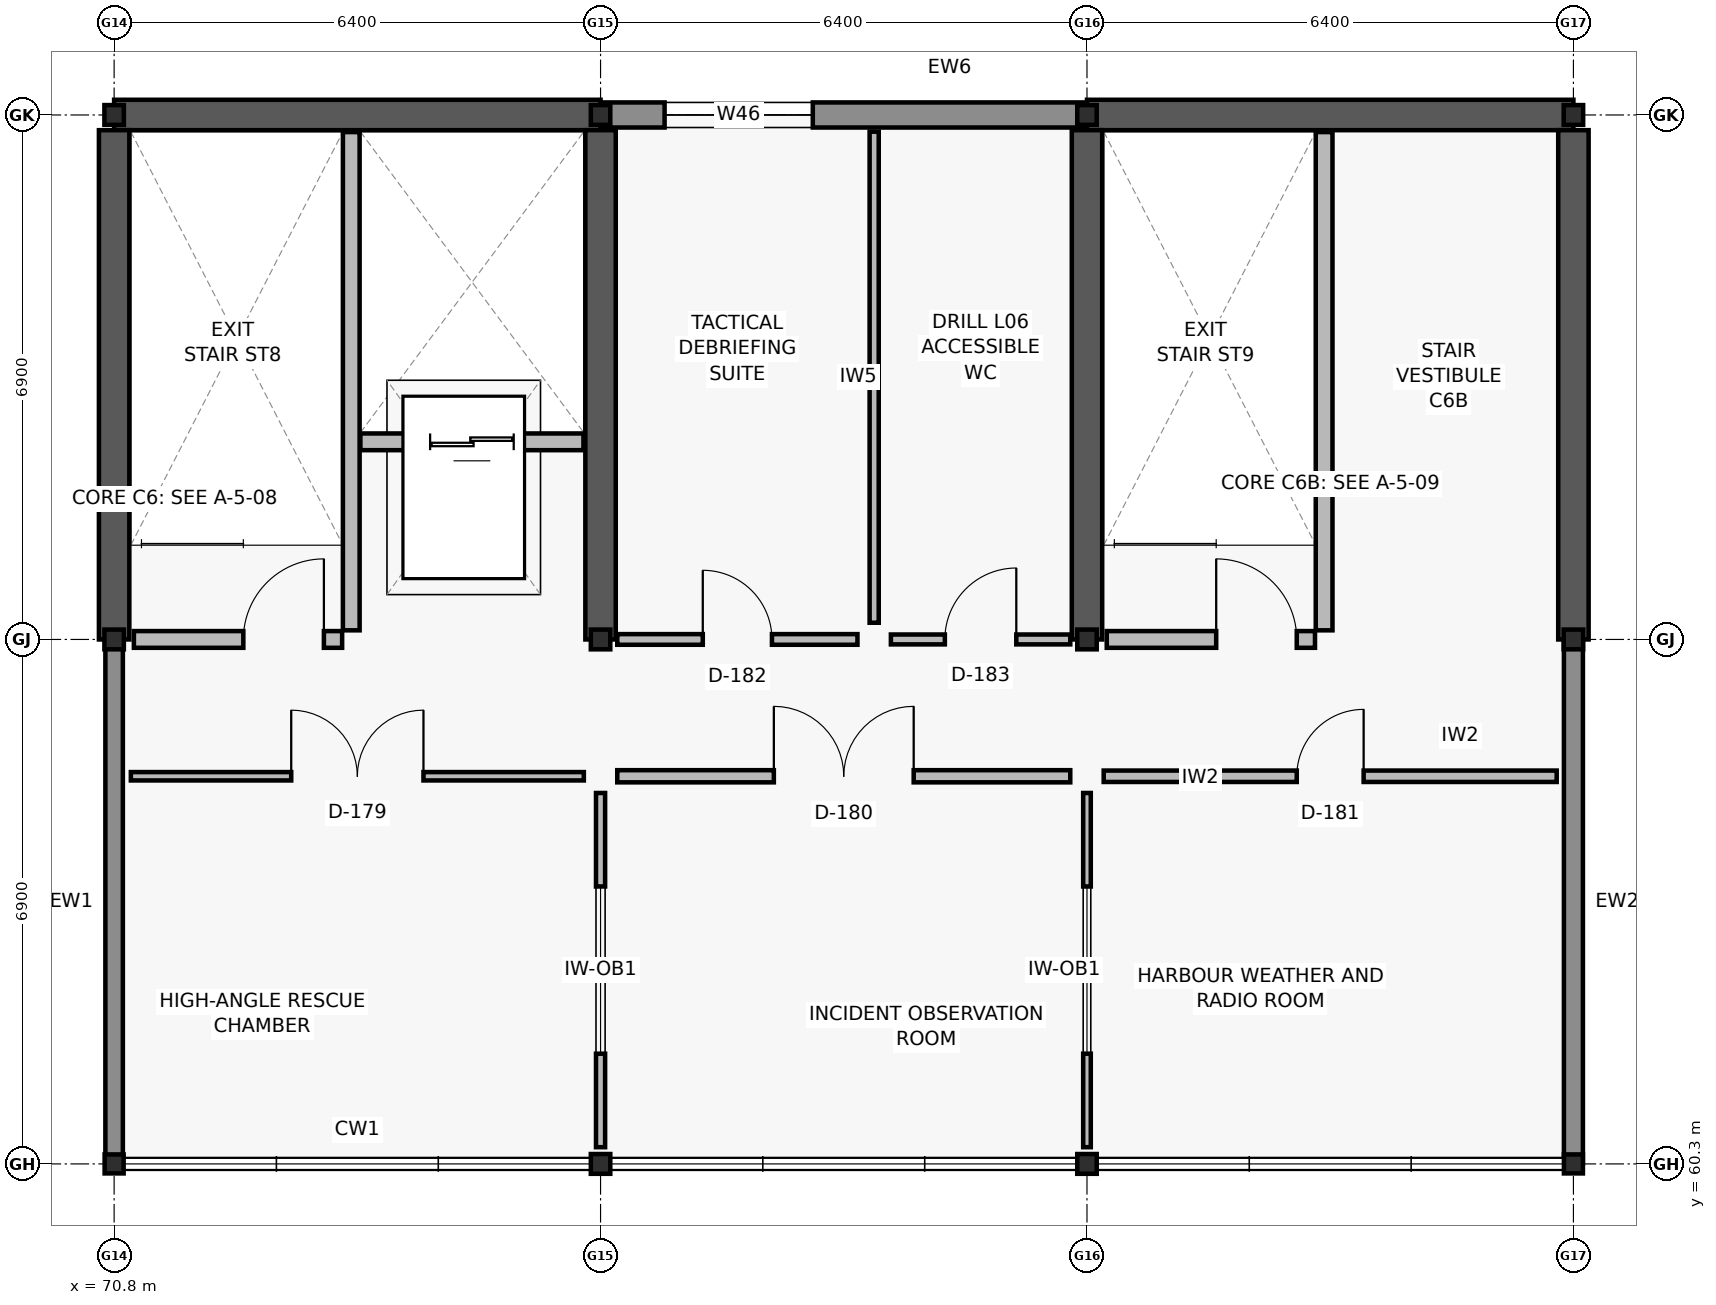
"""IFC4 building model, lengths in metres.
Left out: names, types, materials, properties, quantities, classifications, styles, units other than length and angle.
Written with IfcOpenShell. Run it as: python <this file> out.ifc"""

import sys

from ifc_helpers import new_model, si_unit, direction, frame, frame_2d, origin, origin_2d, place, context, subcontext, project, spatial, rectangle, hollow_rectangle, i_section, extrude, element, fill, save


model = new_model("IFC4")
c1 = context("Model", 3, precision=1e-05, world=origin(), true_north=direction((0.0, 1.0)))
c2 = subcontext(c1, "Body", "Model", "MODEL_VIEW")
j1 = project(units=[si_unit("LENGTHUNIT", "METRE"), si_unit("PLANEANGLEUNIT", "RADIAN")], contexts=[c1])
p1 = place(None, origin())
s1 = spatial("IfcSite", under=j1, at=p1, CompositionType="ELEMENT")
p2 = place(p1, origin())
s2 = spatial("IfcBuilding", under=s1, at=p2, CompositionType="ELEMENT")
p3 = place(p2, frame((0.0, 0.0, 25.2)))
s3 = spatial("IfcBuildingStorey", under=s2, at=p3, CompositionType="ELEMENT", Elevation=25.2)
p4 = place(p3, frame((70.8, 60.3, 0.0), z_axis=(0.0, 0.0, 1.0), x_axis=(1.0, 0.0, 0.0)))
e1 = element("IfcColumn", 1, at=p4, inside=s3, PredefinedType="COLUMN", context=c2, shape_type="SweptSolid", body=[
    extrude(hollow_rectangle(XDim=0.25, YDim=0.25, WallThickness=0.012, at=origin_2d()), origin(), (0.0, 0.0, 1.0), 3.9),
])
for number, where, z_axis, x_axis in (
    (2, (70.8, 67.2, 0.0), (0.0, 0.0, 1.0), (1.0, 0.0, 0.0)),
    (3, (70.8, 74.1, 0.0), (0.0, 0.0, 1.0), (1.0, 0.0, 0.0)),
    (4, (77.2, 60.3, 0.0), (0.0, 0.0, 1.0), (1.0, 0.0, 0.0)),
    (5, (77.2, 67.2, 0.0), (0.0, 0.0, 1.0), (1.0, 0.0, 0.0)),
    (6, (77.2, 74.1, 0.0), (0.0, 0.0, 1.0), (1.0, 0.0, 0.0)),
    (7, (83.6, 60.3, 0.0), (0.0, 0.0, 1.0), (1.0, 0.0, 0.0)),
    (8, (83.6, 67.2, 0.0), (0.0, 0.0, 1.0), (1.0, 0.0, 0.0)),
    (9, (83.6, 74.1, 0.0), (0.0, 0.0, 1.0), (1.0, 0.0, 0.0)),
):
    element("IfcColumn", number, at=place(p3, frame(where, z_axis=z_axis, x_axis=x_axis)), inside=s3, PredefinedType="COLUMN", context=c2, shape_type="SweptSolid", body=[
        extrude(i_section(OverallWidth=0.256, OverallDepth=0.26, WebThickness=0.01, FlangeThickness=0.017, FilletRadius=0.013, at=origin_2d()), origin(), (0.0, 0.0, 1.0), 3.9),
    ])
p5 = place(p3, frame((90.0, 60.3, 0.0), z_axis=(0.0, 0.0, 1.0), x_axis=(1.0, 0.0, 0.0)))
e10 = element("IfcColumn", 10, at=p5, inside=s3, PredefinedType="COLUMN", context=c2, shape_type="SweptSolid", body=[
    extrude(hollow_rectangle(XDim=0.25, YDim=0.25, WallThickness=0.012, at=origin_2d()), origin(), (0.0, 0.0, 1.0), 3.9),
])
for number, where, z_axis, x_axis in (
    (11, (90.0, 67.2, 0.0), (0.0, 0.0, 1.0), (1.0, 0.0, 0.0)),
    (12, (90.0, 74.1, 0.0), (0.0, 0.0, 1.0), (1.0, 0.0, 0.0)),
):
    element("IfcColumn", number, at=place(p3, frame(where, z_axis=z_axis, x_axis=x_axis)), inside=s3, PredefinedType="COLUMN", context=c2, shape_type="SweptSolid", body=[
        extrude(i_section(OverallWidth=0.256, OverallDepth=0.26, WebThickness=0.01, FlangeThickness=0.017, FilletRadius=0.013, at=origin_2d()), origin(), (0.0, 0.0, 1.0), 3.9),
    ])
p6 = place(p3, frame((70.8, 74.1, 0.0), z_axis=(0.0, 0.0, 1.0), x_axis=(1.0, 0.0, 0.0)))
e13 = element("IfcWall", 13, at=p6, inside=s3, PredefinedType="SHEAR", context=c2, shape_type="SweptSolid", body=[
    extrude(rectangle(XDim=6.4, YDim=0.4, at=frame_2d((3.2, 0.0))), origin(), (0.0, 0.0, 1.0), 3.66),
])
for number, where, z_axis, x_axis in (
    (14, (70.8, 67.2, 0.0), (0.0, 0.0, 1.0), (0.0, 1.0, 0.0)),
    (15, (77.2, 67.2, 0.0), (0.0, 0.0, 1.0), (0.0, 1.0, 0.0)),
):
    element("IfcWall", number, at=place(p3, frame(where, z_axis=z_axis, x_axis=x_axis)), inside=s3, PredefinedType="SHEAR", context=c2, shape_type="SweptSolid", body=[
        extrude(rectangle(XDim=6.7, YDim=0.4, at=frame_2d((3.35, 0.0))), origin(), (0.0, 0.0, 1.0), 3.66),
    ])
p7 = place(p3, frame((83.6, 74.1, 0.0), z_axis=(0.0, 0.0, 1.0), x_axis=(1.0, 0.0, 0.0)))
e16 = element("IfcWall", 16, at=p7, inside=s3, PredefinedType="SHEAR", context=c2, shape_type="SweptSolid", body=[
    extrude(rectangle(XDim=6.4, YDim=0.4, at=frame_2d((3.2, 0.0))), origin(), (0.0, 0.0, 1.0), 3.66),
])
for number, where, z_axis, x_axis in (
    (17, (83.6, 67.2, 0.0), (0.0, 0.0, 1.0), (0.0, 1.0, 0.0)),
    (18, (90.0, 67.2, 0.0), (0.0, 0.0, 1.0), (0.0, 1.0, 0.0)),
):
    element("IfcWall", number, at=place(p3, frame(where, z_axis=z_axis, x_axis=x_axis)), inside=s3, PredefinedType="SHEAR", context=c2, shape_type="SweptSolid", body=[
        extrude(rectangle(XDim=6.7, YDim=0.4, at=frame_2d((3.35, 0.0))), origin(), (0.0, 0.0, 1.0), 3.66),
    ])
p8 = place(p3, frame((77.205, 74.1, 0.0), z_axis=(0.0, 0.0, 1.0), x_axis=(1.0, 0.0, 0.0)))
e19 = element("IfcWall", 19, at=p8, inside=s3, PredefinedType="SOLIDWALL", context=c2, shape_type="SweptSolid", body=[
    extrude(rectangle(XDim=6.39, YDim=0.33, at=frame_2d((3.195, 0.0))), origin(), (0.0, 0.0, 1.0), 3.02),
])
p9 = place(p8, frame((0.837, 0.0, 0.8)))
e20 = element("IfcOpeningElement", 20, at=p9, cuts=e19, PredefinedType="OPENING", context=c2, shape_type="SweptSolid", body=[
    extrude(rectangle(XDim=1.95, YDim=1.95, at=frame_2d((0.975, 0.975))), frame((0.0, 0.175, 0.0), z_axis=(0.0, -1.0, 0.0), x_axis=(1.0, 0.0, 0.0)), (0.0, 0.0, 1.0), 0.35),
])
p10 = place(p3, frame((70.8, 60.305, 0.0), z_axis=(0.0, 0.0, 1.0), x_axis=(0.0, 1.0, 0.0)))
e21 = element("IfcWall", 21, at=p10, inside=s3, PredefinedType="SOLIDWALL", context=c2, shape_type="SweptSolid", body=[
    extrude(rectangle(XDim=6.89, YDim=0.23, at=frame_2d((3.445, 0.0))), origin(), (0.0, 0.0, 1.0), 3.02),
])
p11 = place(p3, frame((90.0, 67.195, 0.0), z_axis=(0.0, 0.0, 1.0), x_axis=(0.0, -1.0, 0.0)))
e22 = element("IfcWall", 22, at=p11, inside=s3, PredefinedType="SOLIDWALL", context=c2, shape_type="SweptSolid", body=[
    extrude(rectangle(XDim=6.89, YDim=0.25, at=frame_2d((3.445, 0.0))), origin(), (0.0, 0.0, 1.0), 3.02),
])
p12 = place(p3, frame((73.92, 67.32, 0.0), z_axis=(0.0, 0.0, 1.0), x_axis=(0.0, 1.0, 0.0)))
e23 = element("IfcWall", 23, at=p12, inside=s3, PredefinedType="SOLIDWALL", context=c2, shape_type="SweptSolid", body=[
    extrude(rectangle(XDim=6.555, YDim=0.22, at=frame_2d((3.277, 0.0))), origin(), (0.0, 0.0, 1.0), 3.02),
])
p13 = place(p3, frame((71.06, 67.2, 0.0), z_axis=(0.0, 0.0, 1.0), x_axis=(1.0, 0.0, 0.0)))
e24 = element("IfcWall", 24, at=p13, inside=s3, PredefinedType="SOLIDWALL", context=c2, shape_type="SweptSolid", body=[
    extrude(rectangle(XDim=2.74, YDim=0.22, at=frame_2d((1.37, 0.0))), origin(), (0.0, 0.0, 1.0), 3.02),
])
p14 = place(p13, frame((1.44, 0.0, 0.0)))
e25 = element("IfcOpeningElement", 25, at=p14, cuts=e24, PredefinedType="OPENING", context=c2, shape_type="SweptSolid", body=[
    extrude(rectangle(XDim=1.06, YDim=2.1, at=frame_2d((0.53, 1.05))), frame((0.0, 0.12, 0.0), z_axis=(0.0, -1.0, 0.0), x_axis=(1.0, 0.0, 0.0)), (0.0, 0.0, 1.0), 0.24),
])
p15 = place(p3, frame((74.04, 69.8, 0.0), z_axis=(0.0, 0.0, 1.0), x_axis=(1.0, 0.0, 0.0)))
e26 = element("IfcWall", 26, at=p15, inside=s3, PredefinedType="SOLIDWALL", context=c2, shape_type="SweptSolid", body=[
    extrude(rectangle(XDim=2.935, YDim=0.22, at=frame_2d((1.468, 0.0))), origin(), (0.0, 0.0, 1.0), 3.02),
])
p16 = place(p15, frame((0.917, 0.0, 0.0)))
e27 = element("IfcOpeningElement", 27, at=p16, cuts=e26, PredefinedType="OPENING", context=c2, shape_type="SweptSolid", body=[
    extrude(rectangle(XDim=1.1, YDim=2.1, at=frame_2d((0.55, 1.05))), frame((0.0, 0.12, 0.0), z_axis=(0.0, -1.0, 0.0), x_axis=(1.0, 0.0, 0.0)), (0.0, 0.0, 1.0), 0.24),
])
p17 = place(p3, frame((86.72, 67.32, 0.0), z_axis=(0.0, 0.0, 1.0), x_axis=(0.0, 1.0, 0.0)))
e28 = element("IfcWall", 28, at=p17, inside=s3, PredefinedType="SOLIDWALL", context=c2, shape_type="SweptSolid", body=[
    extrude(rectangle(XDim=6.555, YDim=0.22, at=frame_2d((3.277, 0.0))), origin(), (0.0, 0.0, 1.0), 3.66),
])
p18 = place(p3, frame((83.86, 67.2, 0.0), z_axis=(0.0, 0.0, 1.0), x_axis=(1.0, 0.0, 0.0)))
e29 = element("IfcWall", 29, at=p18, inside=s3, PredefinedType="SOLIDWALL", context=c2, shape_type="SweptSolid", body=[
    extrude(rectangle(XDim=2.74, YDim=0.22, at=frame_2d((1.37, 0.0))), origin(), (0.0, 0.0, 1.0), 3.02),
])
p19 = place(p18, frame((1.44, 0.0, 0.0)))
e30 = element("IfcOpeningElement", 30, at=p19, cuts=e29, PredefinedType="OPENING", context=c2, shape_type="SweptSolid", body=[
    extrude(rectangle(XDim=1.06, YDim=2.1, at=frame_2d((0.53, 1.05))), frame((0.0, 0.12, 0.0), z_axis=(0.0, -1.0, 0.0), x_axis=(1.0, 0.0, 0.0)), (0.0, 0.0, 1.0), 0.24),
])
p20 = place(p3, frame((77.2, 60.52, 0.0), z_axis=(0.0, 0.0, 1.0), x_axis=(0.0, 1.0, 0.0)))
e31 = element("IfcWall", 31, at=p20, inside=s3, PredefinedType="PARTITIONING", context=c2, shape_type="SweptSolid", body=[
    extrude(rectangle(XDim=4.66, YDim=0.12, at=frame_2d((2.33, 0.0))), origin(), (0.0, 0.0, 1.0), 3.0),
])
p21 = place(p20, frame((1.23, 0.0, 0.95)))
e32 = element("IfcOpeningElement", 32, at=p21, cuts=e31, PredefinedType="OPENING", context=c2, shape_type="SweptSolid", body=[
    extrude(rectangle(XDim=2.2, YDim=1.3, at=frame_2d((1.1, 0.65))), frame((0.0, 0.07, 0.0), z_axis=(0.0, -1.0, 0.0), x_axis=(1.0, 0.0, 0.0)), (0.0, 0.0, 1.0), 0.14),
])
p22 = place(p3, frame((71.02, 65.4, 0.0), z_axis=(0.0, 0.0, 1.0), x_axis=(1.0, 0.0, 0.0)))
e33 = element("IfcWall", 33, at=p22, inside=s3, PredefinedType="PARTITIONING", context=c2, shape_type="SweptSolid", body=[
    extrude(rectangle(XDim=5.96, YDim=0.11, at=frame_2d((2.98, 0.0))), origin(), (0.0, 0.0, 1.0), 3.0),
])
p23 = place(p22, frame((2.11, 0.0, 0.0)))
e34 = element("IfcOpeningElement", 34, at=p23, cuts=e33, PredefinedType="OPENING", context=c2, shape_type="SweptSolid", body=[
    extrude(rectangle(XDim=1.74, YDim=2.2, at=frame_2d((0.87, 1.1))), frame((0.0, 0.065, 0.0), z_axis=(0.0, -1.0, 0.0), x_axis=(1.0, 0.0, 0.0)), (0.0, 0.0, 1.0), 0.13),
])
p24 = place(p3, frame((83.6, 60.52, 0.0), z_axis=(0.0, 0.0, 1.0), x_axis=(0.0, 1.0, 0.0)))
e35 = element("IfcWall", 35, at=p24, inside=s3, PredefinedType="PARTITIONING", context=c2, shape_type="SweptSolid", body=[
    extrude(rectangle(XDim=4.66, YDim=0.1, at=frame_2d((2.33, 0.0))), origin(), (0.0, 0.0, 1.0), 3.0),
])
p25 = place(p24, frame((1.23, 0.0, 0.95)))
e36 = element("IfcOpeningElement", 36, at=p25, cuts=e35, PredefinedType="OPENING", context=c2, shape_type="SweptSolid", body=[
    extrude(rectangle(XDim=2.2, YDim=1.3, at=frame_2d((1.1, 0.65))), frame((0.0, 0.06, 0.0), z_axis=(0.0, -1.0, 0.0), x_axis=(1.0, 0.0, 0.0)), (0.0, 0.0, 1.0), 0.12),
])
p26 = place(p3, frame((77.42, 65.4, 0.0), z_axis=(0.0, 0.0, 1.0), x_axis=(1.0, 0.0, 0.0)))
e37 = element("IfcWall", 37, at=p26, inside=s3, PredefinedType="PARTITIONING", context=c2, shape_type="SweptSolid", body=[
    extrude(rectangle(XDim=5.96, YDim=0.16, at=frame_2d((2.98, 0.0))), origin(), (0.0, 0.0, 1.0), 3.0),
])
p27 = place(p26, frame((2.06, 0.0, 0.0)))
e38 = element("IfcOpeningElement", 38, at=p27, cuts=e37, PredefinedType="OPENING", context=c2, shape_type="SweptSolid", body=[
    extrude(rectangle(XDim=1.84, YDim=2.22, at=frame_2d((0.92, 1.11))), frame((0.0, 0.09, 0.0), z_axis=(0.0, -1.0, 0.0), x_axis=(1.0, 0.0, 0.0)), (0.0, 0.0, 1.0), 0.18),
])
p28 = place(p3, frame((83.82, 65.4, 0.0), z_axis=(0.0, 0.0, 1.0), x_axis=(1.0, 0.0, 0.0)))
e39 = element("IfcWall", 39, at=p28, inside=s3, PredefinedType="PARTITIONING", context=c2, shape_type="SweptSolid", body=[
    extrude(rectangle(XDim=5.96, YDim=0.15, at=frame_2d((2.98, 0.0))), origin(), (0.0, 0.0, 1.0), 3.0),
])
p29 = place(p28, frame((2.54, 0.0, 0.0)))
e40 = element("IfcOpeningElement", 40, at=p29, cuts=e39, PredefinedType="OPENING", context=c2, shape_type="SweptSolid", body=[
    extrude(rectangle(XDim=0.88, YDim=2.04, at=frame_2d((0.44, 1.02))), frame((0.0, 0.085, 0.0), z_axis=(0.0, -1.0, 0.0), x_axis=(1.0, 0.0, 0.0)), (0.0, 0.0, 1.0), 0.17),
])
p30 = place(p3, frame((77.42, 67.2, 0.0), z_axis=(0.0, 0.0, 1.0), x_axis=(1.0, 0.0, 0.0)))
e41 = element("IfcWall", 41, at=p30, inside=s3, PredefinedType="PARTITIONING", context=c2, shape_type="SweptSolid", body=[
    extrude(rectangle(XDim=3.16, YDim=0.14, at=frame_2d((1.58, 0.0))), origin(), (0.0, 0.0, 1.0), 3.0),
])
p31 = place(p30, frame((1.125, 0.0, 0.0)))
e42 = element("IfcOpeningElement", 42, at=p31, cuts=e41, PredefinedType="OPENING", context=c2, shape_type="SweptSolid", body=[
    extrude(rectangle(XDim=0.91, YDim=2.06, at=frame_2d((0.455, 1.03))), frame((0.0, 0.08, 0.0), z_axis=(0.0, -1.0, 0.0), x_axis=(1.0, 0.0, 0.0)), (0.0, 0.0, 1.0), 0.16),
])
p32 = place(p3, frame((81.02, 67.2, 0.0), z_axis=(0.0, 0.0, 1.0), x_axis=(1.0, 0.0, 0.0)))
e43 = element("IfcWall", 43, at=p32, inside=s3, PredefinedType="PARTITIONING", context=c2, shape_type="SweptSolid", body=[
    extrude(rectangle(XDim=2.36, YDim=0.13, at=frame_2d((1.18, 0.0))), origin(), (0.0, 0.0, 1.0), 3.0),
])
p33 = place(p32, frame((0.71, 0.0, 0.0)))
e44 = element("IfcOpeningElement", 44, at=p33, cuts=e43, PredefinedType="OPENING", context=c2, shape_type="SweptSolid", body=[
    extrude(rectangle(XDim=0.94, YDim=2.08, at=frame_2d((0.47, 1.04))), frame((0.0, 0.075, 0.0), z_axis=(0.0, -1.0, 0.0), x_axis=(1.0, 0.0, 0.0)), (0.0, 0.0, 1.0), 0.15),
])
p34 = place(p3, frame((80.8, 67.42, 0.0), z_axis=(0.0, 0.0, 1.0), x_axis=(0.0, 1.0, 0.0)))
e45 = element("IfcWall", 45, at=p34, inside=s3, PredefinedType="PARTITIONING", context=c2, shape_type="SweptSolid", body=[
    extrude(rectangle(XDim=6.46, YDim=0.12, at=frame_2d((3.23, 0.0))), origin(), (0.0, 0.0, 1.0), 3.0),
])
p35 = place(p9, origin())
e46 = element("IfcWindow", 46, at=p35, inside=s3, PartitioningType="DOUBLE_PANEL_VERTICAL", PredefinedType="WINDOW", context=c2, shape_type="SweptSolid", body=[
    extrude(rectangle(XDim=1.95, YDim=1.95, at=frame_2d((0.975, 0.975))), frame((0.0, 0.03, 0.0), z_axis=(0.0, -1.0, 0.0), x_axis=(1.0, 0.0, 0.0)), (0.0, 0.0, 1.0), 0.06),
])
fill(e20, e46)
p36 = place(p14, origin())
e47 = element("IfcDoor", 47, at=p36, inside=s3, OperationType="SINGLE_SWING_RIGHT", PredefinedType="DOOR", context=c2, shape_type="SweptSolid", body=[
    extrude(rectangle(XDim=1.06, YDim=2.1, at=frame_2d((0.53, 1.05))), frame((0.0, 0.025, 0.0), z_axis=(0.0, -1.0, 0.0), x_axis=(1.0, 0.0, 0.0)), (0.0, 0.0, 1.0), 0.05),
])
fill(e25, e47)
p37 = place(p16, origin())
e48 = element("IfcDoor", 48, at=p37, inside=s3, OperationType="DOUBLE_DOOR_SLIDING", PredefinedType="DOOR", context=c2, shape_type="SweptSolid", body=[
    extrude(rectangle(XDim=1.1, YDim=2.1, at=frame_2d((0.55, 1.05))), frame((0.0, 0.025, 0.0), z_axis=(0.0, -1.0, 0.0), x_axis=(1.0, 0.0, 0.0)), (0.0, 0.0, 1.0), 0.05),
])
fill(e27, e48)
p38 = place(p19, origin())
e49 = element("IfcDoor", 49, at=p38, inside=s3, OperationType="SINGLE_SWING_LEFT", PredefinedType="DOOR", context=c2, shape_type="SweptSolid", body=[
    extrude(rectangle(XDim=1.06, YDim=2.1, at=frame_2d((0.53, 1.05))), frame((0.0, 0.025, 0.0), z_axis=(0.0, -1.0, 0.0), x_axis=(1.0, 0.0, 0.0)), (0.0, 0.0, 1.0), 0.05),
])
fill(e30, e49)
p39 = place(p21, origin())
e50 = element("IfcWindow", 50, at=p39, inside=s3, PartitioningType="DOUBLE_PANEL_VERTICAL", PredefinedType="WINDOW", context=c2, shape_type="SweptSolid", body=[
    extrude(rectangle(XDim=2.2, YDim=1.3, at=frame_2d((1.1, 0.65))), frame((0.0, 0.03, 0.0), z_axis=(0.0, -1.0, 0.0), x_axis=(1.0, 0.0, 0.0)), (0.0, 0.0, 1.0), 0.06),
])
fill(e32, e50)
p40 = place(p23, origin())
e51 = element("IfcDoor", 51, at=p40, inside=s3, OperationType="DOUBLE_DOOR_SINGLE_SWING", PredefinedType="DOOR", context=c2, shape_type="SweptSolid", body=[
    extrude(rectangle(XDim=1.74, YDim=2.2, at=frame_2d((0.87, 1.1))), frame((0.0, 0.025, 0.0), z_axis=(0.0, -1.0, 0.0), x_axis=(1.0, 0.0, 0.0)), (0.0, 0.0, 1.0), 0.05),
])
fill(e34, e51)
p41 = place(p25, origin())
e52 = element("IfcWindow", 52, at=p41, inside=s3, PartitioningType="DOUBLE_PANEL_VERTICAL", PredefinedType="WINDOW", context=c2, shape_type="SweptSolid", body=[
    extrude(rectangle(XDim=2.2, YDim=1.3, at=frame_2d((1.1, 0.65))), frame((0.0, 0.03, 0.0), z_axis=(0.0, -1.0, 0.0), x_axis=(1.0, 0.0, 0.0)), (0.0, 0.0, 1.0), 0.06),
])
fill(e36, e52)
p42 = place(p27, origin())
e53 = element("IfcDoor", 53, at=p42, inside=s3, OperationType="DOUBLE_DOOR_SINGLE_SWING", PredefinedType="DOOR", context=c2, shape_type="SweptSolid", body=[
    extrude(rectangle(XDim=1.84, YDim=2.22, at=frame_2d((0.92, 1.11))), frame((0.0, 0.025, 0.0), z_axis=(0.0, -1.0, 0.0), x_axis=(1.0, 0.0, 0.0)), (0.0, 0.0, 1.0), 0.05),
])
fill(e38, e53)
p43 = place(p29, origin())
e54 = element("IfcDoor", 54, at=p43, inside=s3, OperationType="SINGLE_SWING_RIGHT", PredefinedType="DOOR", context=c2, shape_type="SweptSolid", body=[
    extrude(rectangle(XDim=0.88, YDim=2.04, at=frame_2d((0.44, 1.02))), frame((0.0, 0.025, 0.0), z_axis=(0.0, -1.0, 0.0), x_axis=(1.0, 0.0, 0.0)), (0.0, 0.0, 1.0), 0.05),
])
fill(e40, e54)
p44 = place(p31, origin())
e55 = element("IfcDoor", 55, at=p44, inside=s3, OperationType="SINGLE_SWING_LEFT", PredefinedType="DOOR", context=c2, shape_type="SweptSolid", body=[
    extrude(rectangle(XDim=0.91, YDim=2.06, at=frame_2d((0.455, 1.03))), frame((0.0, 0.025, 0.0), z_axis=(0.0, -1.0, 0.0), x_axis=(1.0, 0.0, 0.0)), (0.0, 0.0, 1.0), 0.05),
])
fill(e42, e55)
p45 = place(p33, origin())
e56 = element("IfcDoor", 56, at=p45, inside=s3, OperationType="SINGLE_SWING_RIGHT", PredefinedType="DOOR", context=c2, shape_type="SweptSolid", body=[
    extrude(rectangle(XDim=0.94, YDim=2.08, at=frame_2d((0.47, 1.04))), frame((0.0, 0.025, 0.0), z_axis=(0.0, -1.0, 0.0), x_axis=(1.0, 0.0, 0.0)), (0.0, 0.0, 1.0), 0.05),
])
fill(e44, e56)
save(model, sys.argv[1])
